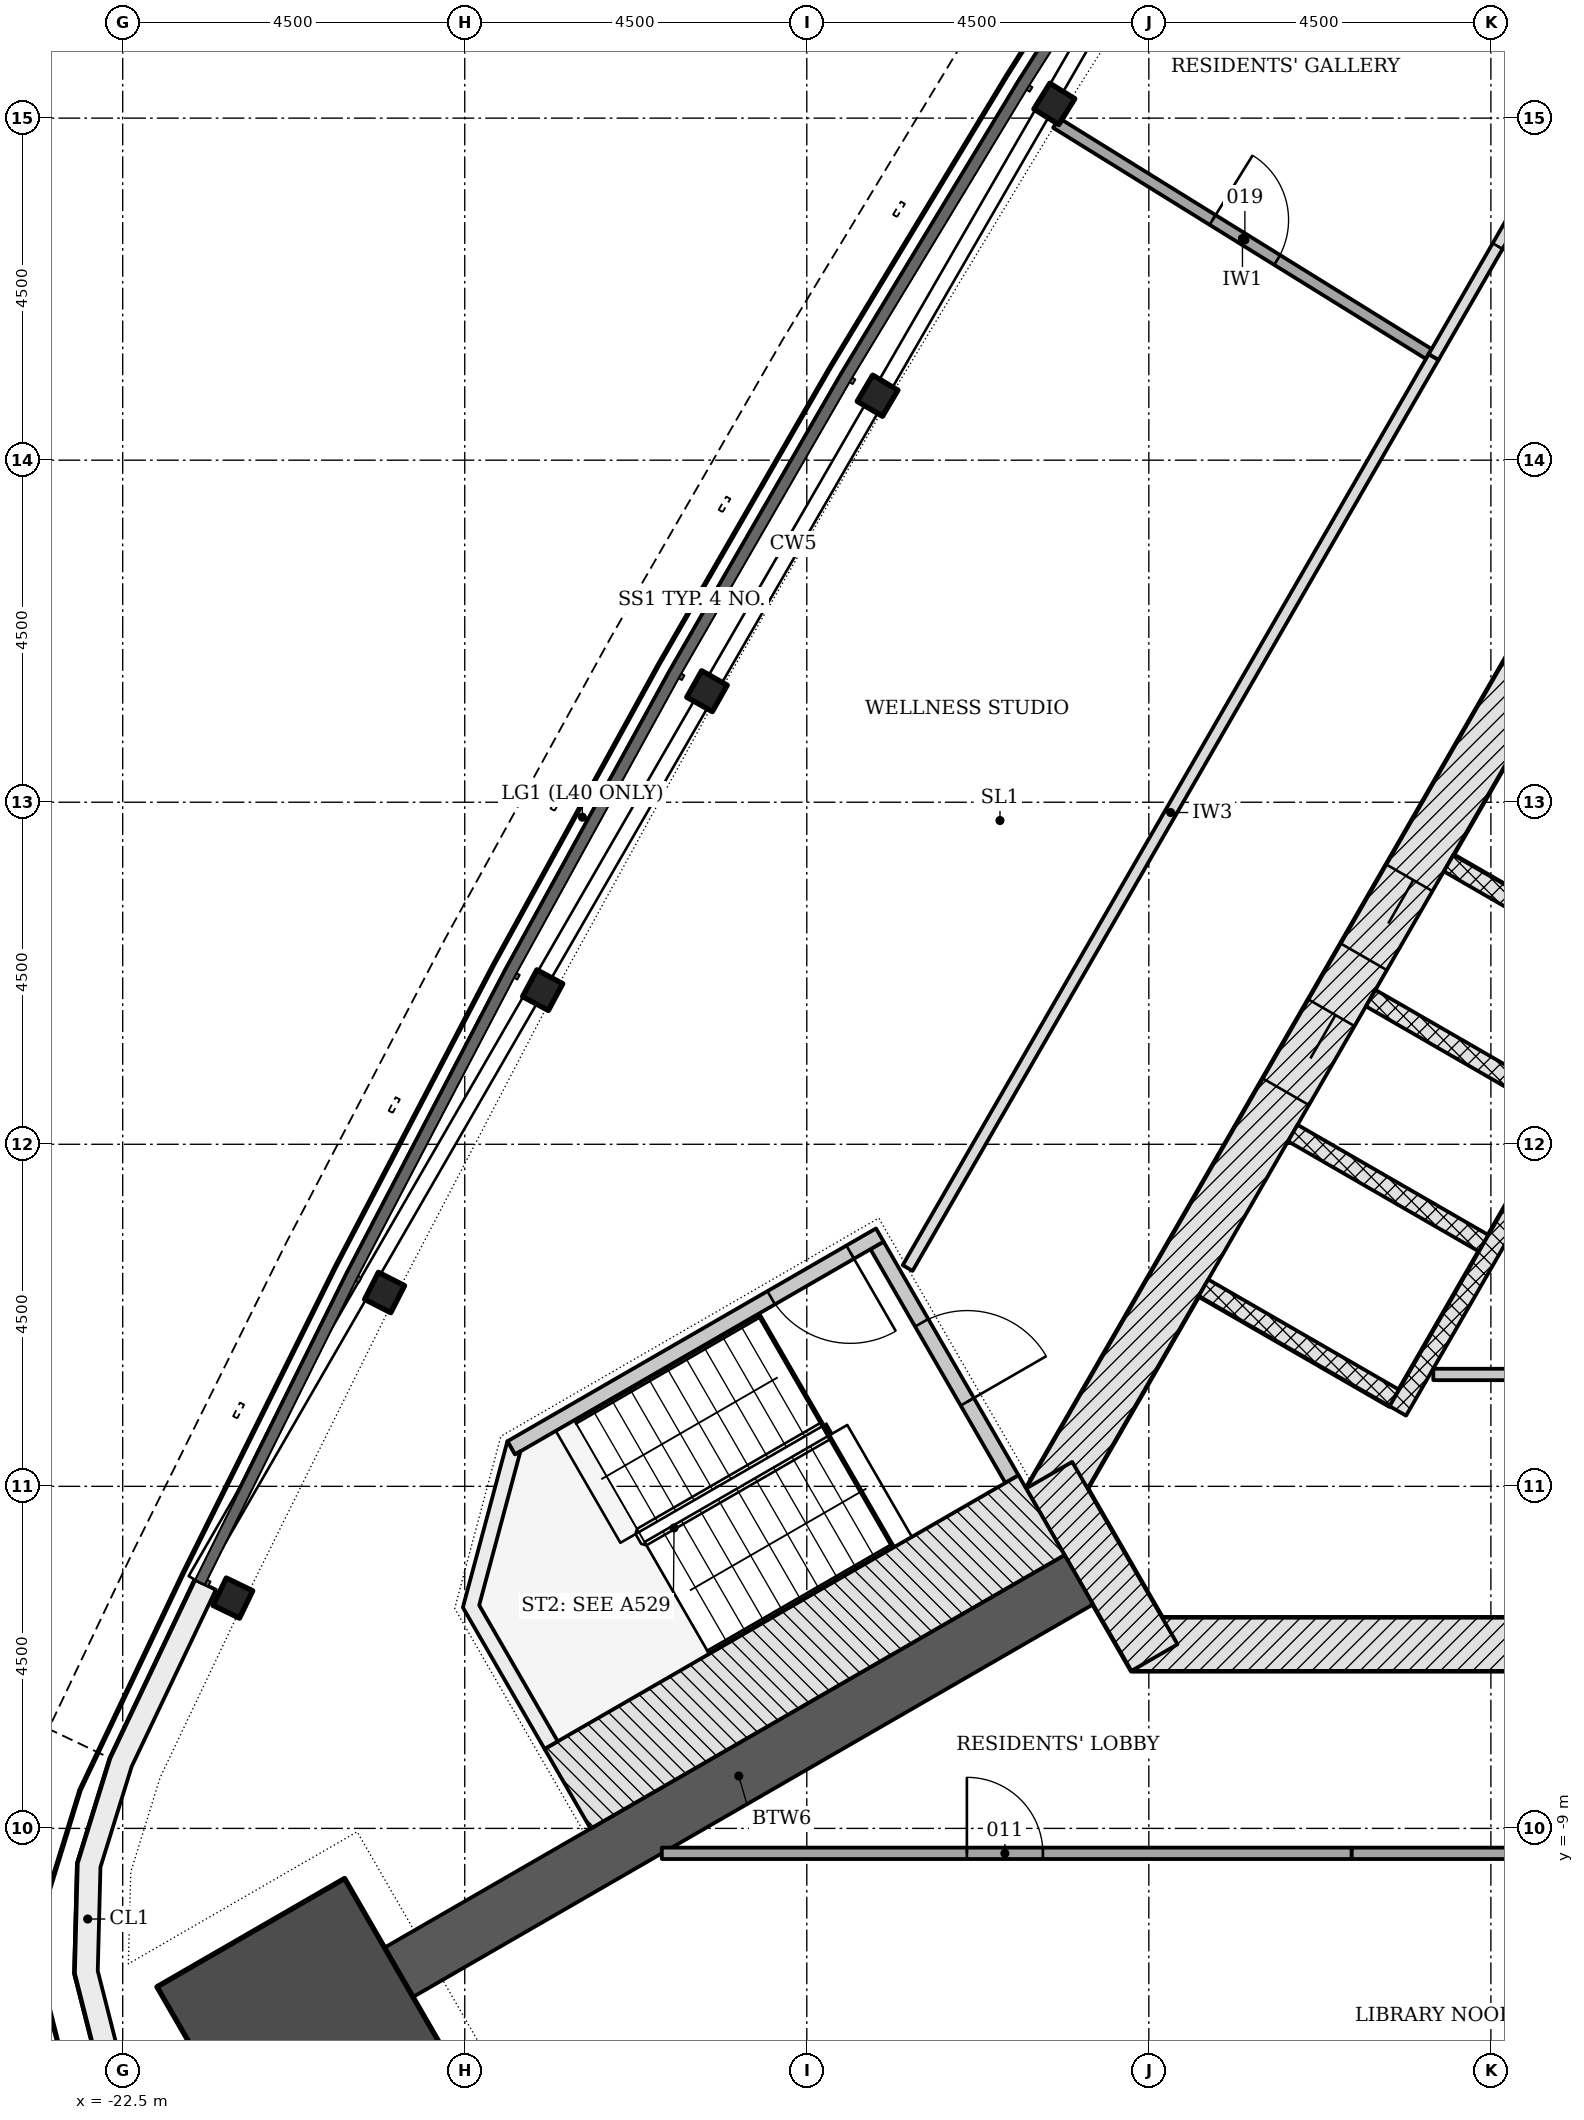
"""IFC4 building model, lengths in metres.
Left out: names, types, materials, properties, quantities, classifications, styles, units other than length and angle.
Written with IfcOpenShell. Run it as: python <this file> out.ifc"""

import sys

from ifc_helpers import new_model, si_unit, direction, frame, frame_2d, origin, origin_2d, place, context, subcontext, project, spatial, polyline, rectangle, i_section, outline, extrude, element, fill, save


model = new_model("IFC4")
c1 = context("Model", 3, precision=1e-05, world=origin(), true_north=direction((0.0, 1.0)))
c2 = subcontext(c1, "Body", "Model", "MODEL_VIEW")
j1 = project(units=[si_unit("LENGTHUNIT", "METRE"), si_unit("PLANEANGLEUNIT", "RADIAN")], contexts=[c1])
p1 = place(None, origin())
s1 = spatial("IfcSite", under=j1, at=p1, CompositionType="ELEMENT")
p2 = place(p1, origin())
s2 = spatial("IfcBuilding", under=s1, at=p2, CompositionType="ELEMENT")
p3 = place(p2, frame((0.0, 0.0, 158.1)))
s3 = spatial("IfcBuildingStorey", under=s2, at=p3, CompositionType="ELEMENT", Elevation=158.1)
p4 = place(p3, frame((-9.229, -6.578, -0.2), z_axis=(0.0, 0.0, 1.0), x_axis=(1.0, 0.0, 0.0)))
e1 = element("IfcWall", 1, at=p4, inside=s3, PredefinedType="SHEAR", context=c2, shape_type="SweptSolid", body=[
    extrude(rectangle(XDim=18.458, YDim=0.7, at=frame_2d((9.229, 0.0))), origin(), (0.0, 0.0, 1.0), 3.6),
])
p5 = place(p4, frame((10.7, 0.0, 0.2)))
e2 = element("IfcOpeningElement", 2, at=p5, cuts=e1, PredefinedType="OPENING", context=c2, shape_type="SweptSolid", body=[
    extrude(rectangle(XDim=1.0, YDim=2.1, at=frame_2d((0.5, 1.05))), frame((0.0, 0.36, 0.0), z_axis=(0.0, -1.0, 0.0), x_axis=(1.0, 0.0, 0.0)), (0.0, 0.0, 1.0), 0.72),
])
p6 = place(p4, frame((4.977, 0.0, 0.2)))
e3 = element("IfcOpeningElement", 3, at=p6, cuts=e1, PredefinedType="OPENING", context=c2, shape_type="SweptSolid", body=[
    extrude(rectangle(XDim=0.9, YDim=2.1, at=frame_2d((0.45, 1.05))), frame((0.0, 0.36, 0.0), z_axis=(0.0, -1.0, 0.0), x_axis=(1.0, 0.0, 0.0)), (0.0, 0.0, 1.0), 0.72),
])
p7 = place(p4, frame((14.552, 0.0, 0.2)))
e4 = element("IfcOpeningElement", 4, at=p7, cuts=e1, PredefinedType="OPENING", context=c2, shape_type="SweptSolid", body=[
    extrude(rectangle(XDim=0.9, YDim=2.1, at=frame_2d((0.45, 1.05))), frame((0.0, 0.36, 0.0), z_axis=(0.0, -1.0, 0.0), x_axis=(1.0, 0.0, 0.0)), (0.0, 0.0, 1.0), 0.72),
])
p8 = place(p3, frame((-1.083, 11.281, -0.2), z_axis=(0.0, 0.0, 1.0), x_axis=(-0.500001446645, -0.866024568562, 0.0)))
e5 = element("IfcWall", 5, at=p8, inside=s3, PredefinedType="SHEAR", context=c2, shape_type="SweptSolid", body=[
    extrude(rectangle(XDim=18.458, YDim=0.7, at=frame_2d((9.229, 0.0))), origin(), (0.0, 0.0, 1.0), 3.6),
])
p9 = place(p8, frame((8.979, 0.0, 0.2)))
e6 = element("IfcOpeningElement", 6, at=p9, cuts=e5, PredefinedType="OPENING", context=c2, shape_type="SweptSolid", body=[
    extrude(rectangle(XDim=1.2, YDim=2.1, at=frame_2d((0.6, 1.05))), frame((0.0, 0.36, 0.0), z_axis=(0.0, -1.0, 0.0), x_axis=(1.0, 0.0, 0.0)), (0.0, 0.0, 1.0), 0.72),
])
p10 = place(p8, frame((11.029, 0.0, 0.2)))
e7 = element("IfcOpeningElement", 7, at=p10, cuts=e5, PredefinedType="OPENING", context=c2, shape_type="SweptSolid", body=[
    extrude(rectangle(XDim=1.2, YDim=2.1, at=frame_2d((0.6, 1.05))), frame((0.0, 0.36, 0.0), z_axis=(0.0, -1.0, 0.0), x_axis=(1.0, 0.0, 0.0)), (0.0, 0.0, 1.0), 0.72),
])
p11 = place(p3, frame((-10.311, -4.353, -0.2), z_axis=(0.0, 0.0, 1.0), x_axis=(0.500042739161, -0.866000726912, 0.0)))
e8 = element("IfcWall", 8, at=p11, inside=s3, PredefinedType="SHEAR", context=c2, shape_type="SweptSolid", body=[
    extrude(rectangle(XDim=2.771, YDim=0.7, at=frame_2d((1.386, 0.0))), origin(), (0.0, 0.0, 1.0), 3.6),
])
p12 = place(p3, frame((-9.922, -5.728, -0.2), z_axis=(0.0, 0.0, 1.0), x_axis=(-0.866025410072, -0.499999989109, 0.0)))
e9 = element("IfcWall", 9, at=p12, inside=s3, PredefinedType="SHEAR", context=c2, shape_type="SweptSolid", body=[
    extrude(rectangle(XDim=10.331, YDim=0.75, at=frame_2d((5.165, 0.0))), origin(), (0.0, 0.0, 1.0), 3.6),
])
p13 = place(p3, frame((-20.102, -11.606, -0.2), z_axis=(0.0, 0.0, 1.0), x_axis=(-0.866025403784, -0.5, 0.0)))
e10 = element("IfcColumn", 10, at=p13, inside=s3, PredefinedType="COLUMN", context=c2, shape_type="SweptSolid", body=[
    extrude(rectangle(XDim=2.85, YDim=2.85, at=origin_2d()), origin(), (0.0, 0.0, 1.0), 3.6),
])
for number, where, z_axis, x_axis in (
    (11, (-10.244, 13.687, -0.2), (0.0, 0.0, 1.0), (-0.527, -0.85, 0.0)),
    (12, (-12.569, 9.848, -0.2), (0.0, 0.0, 1.0), (-0.509, -0.861, 0.0)),
    (13, (-14.813, 5.961, -0.2), (0.0, 0.0, 1.0), (-0.491, -0.871, 0.0)),
    (14, (-16.975, 2.028, -0.2), (0.0, 0.0, 1.0), (-0.473, -0.881, 0.0)),
    (15, (-19.055, -1.95, -0.2), (0.0, 0.0, 1.0), (-0.454, -0.891, 0.0)),
    (16, (-21.05, -5.97, -0.2), (0.0, 0.0, 1.0), (-0.435, -0.9, 0.0)),
):
    element("IfcColumn", number, at=place(p3, frame(where, z_axis=z_axis, x_axis=x_axis)), inside=s3, PredefinedType="COLUMN", context=c2, shape_type="SweptSolid", body=[
        extrude(i_section(OverallWidth=0.399, OverallDepth=0.386, WebThickness=0.021, FlangeThickness=0.033, FilletRadius=0.015, at=origin_2d()), origin(), (0.0, 0.0, 1.0), 3.6),
    ])
p14 = place(p3, origin())
e17 = element("IfcWall", 17, at=p14, inside=s3, PredefinedType="NOTDEFINED", context=c2, shape_type="SweptSolid", body=[
    extrude(outline(polyline([(-21.545, -5.731), (-22.663, -8.078), (-23.092, -9.461), (-23.129, -10.908), (-22.773, -12.312), (-22.049, -13.566), (-21.011, -14.576), (-19.739, -15.267), (-18.327, -15.587), (-15.736, -15.793), (-15.712, -15.494), (-18.281, -15.29), (-19.632, -14.984), (-20.832, -14.333), (-21.81, -13.38), (-22.492, -12.198), (-22.828, -10.875), (-22.793, -9.51), (-22.382, -8.187), (-21.275, -5.86), (-21.545, -5.731)])), origin(), (0.0, 0.0, 1.0), 3.3),
])
for number, where, z_axis, x_axis in (
    (18, (-5.056, 3.699, -0.2), (0.0, 0.0, 1.0), (0.866, -0.5, 0.0)),
    (19, (-6.081, 1.923, -0.2), (0.0, 0.0, 1.0), (0.866, -0.5, 0.0)),
    (20, (-7.106, 0.148, -0.2), (0.0, 0.0, 1.0), (0.866, -0.5, 0.0)),
    (21, (-8.281, -1.887, -0.2), (0.0, 0.0, 1.0), (0.866, -0.5, 0.0)),
):
    element("IfcWall", number, at=place(p3, frame(where, z_axis=z_axis, x_axis=x_axis)), inside=s3, PredefinedType="PARTITIONING", context=c2, shape_type="SweptSolid", body=[
        extrude(rectangle(XDim=2.9, YDim=0.25, at=frame_2d((1.45, 0.0))), origin(), (0.0, 0.0, 1.0), 3.6),
    ])
p15 = place(p3, frame((-2.374, 2.294, 0.0), z_axis=(0.0, 0.0, 1.0), x_axis=(-0.500003174267, -0.866023571113, 0.0)))
e22 = element("IfcWall", 22, at=p15, inside=s3, PredefinedType="PARTITIONING", context=c2, shape_type="SweptSolid", body=[
    extrude(rectangle(XDim=6.7, YDim=0.25, at=frame_2d((3.35, 0.0))), origin(), (0.0, 0.0, 1.0), 3.4),
])
p16 = place(p3, frame((-5.258, -3.028, 0.0), z_axis=(0.0, 0.0, 1.0), x_axis=(1.0, 0.0, 0.0)))
e23 = element("IfcWall", 23, at=p16, inside=s3, PredefinedType="PARTITIONING", context=c2, shape_type="SweptSolid", body=[
    extrude(rectangle(XDim=6.404, YDim=0.15, at=frame_2d((3.202, 0.0))), origin(), (0.0, 0.0, 1.0), 3.4),
])
p17 = place(p3, frame((-12.576, -1.331, -0.2), z_axis=(0.0, 0.0, 1.0), x_axis=(0.499970499736, -0.8660424351, 0.0)))
e24 = element("IfcWall", 24, at=p17, inside=s3, PredefinedType="SHEAR", context=c2, shape_type="SweptSolid", body=[
    extrude(rectangle(XDim=3.55, YDim=0.2, at=frame_2d((1.775, 0.0))), origin(), (0.0, 0.0, 1.0), 3.6),
])
p18 = place(p17, frame((1.175, 0.0, 0.2)))
e25 = element("IfcOpeningElement", 25, at=p18, cuts=e24, PredefinedType="OPENING", context=c2, shape_type="SweptSolid", body=[
    extrude(rectangle(XDim=1.2, YDim=2.1, at=frame_2d((0.6, 1.05))), frame((0.0, 0.11, 0.0), z_axis=(0.0, -1.0, 0.0), x_axis=(1.0, 0.0, 0.0)), (0.0, 0.0, 1.0), 0.22),
])
p19 = place(p3, frame((-12.539, -1.194, -0.2), z_axis=(0.0, 0.0, 1.0), x_axis=(-0.866045472092, -0.499965239061, 0.0)))
e26 = element("IfcWall", 26, at=p19, inside=s3, PredefinedType="SHEAR", context=c2, shape_type="SweptSolid", body=[
    extrude(rectangle(XDim=5.6, YDim=0.2, at=frame_2d((2.8, 0.0))), origin(), (0.0, 0.0, 1.0), 3.6),
])
p20 = place(p19, frame((0.45, 0.0, 0.2)))
e27 = element("IfcOpeningElement", 27, at=p20, cuts=e26, PredefinedType="OPENING", context=c2, shape_type="SweptSolid", body=[
    extrude(rectangle(XDim=1.2, YDim=2.1, at=frame_2d((0.6, 1.05))), frame((0.0, 0.11, 0.0), z_axis=(0.0, -1.0, 0.0), x_axis=(1.0, 0.0, 0.0)), (0.0, 0.0, 1.0), 0.22),
])
p21 = place(p3, frame((-10.412, -4.879, -0.2), z_axis=(0.0, 0.0, 1.0), x_axis=(-0.866026919366, -0.499997374926, 0.0)))
e28 = element("IfcWall", 28, at=p21, inside=s3, PredefinedType="SHEAR", context=c2, shape_type="SweptSolid", body=[
    extrude(rectangle(XDim=7.2, YDim=1.211, at=frame_2d((3.6, 0.0))), origin(), (0.0, 0.0, 1.0), 3.6),
])
p22 = place(p3, frame((0.0, 0.0, -0.2)))
e29 = element("IfcWall", 29, at=p22, inside=s3, PredefinedType="SHEAR", context=c2, shape_type="SweptSolid", body=[
    extrude(outline(polyline([(-17.439, -3.907), (-18.025, -6.093), (-16.95, -7.955), (-16.777, -7.855), (-17.81, -6.065), (-17.267, -4.039), (-17.339, -4.081), (-17.339, -4.081), (-17.339, -4.081), (-17.339, -4.081), (-17.339, -4.081), (-17.339, -4.081), (-17.339, -4.081), (-17.339, -4.081), (-17.339, -4.081), (-17.339, -4.081), (-17.339, -4.081), (-17.339, -4.081), (-17.339, -4.081), (-17.339, -4.081), (-17.339, -4.081), (-17.339, -4.081), (-17.339, -4.081), (-17.439, -3.907)])), origin(), (0.0, 0.0, 1.0), 3.6),
])
p23 = place(p3, frame((-15.407, -9.328, 0.0), z_axis=(0.0, 0.0, 1.0), x_axis=(1.0, 0.0, 0.0)))
e30 = element("IfcWall", 30, at=p23, inside=s3, PredefinedType="PARTITIONING", context=c2, shape_type="SweptSolid", body=[
    extrude(rectangle(XDim=9.076, YDim=0.15, at=frame_2d((4.538, 0.0))), origin(), (0.0, 0.0, 1.0), 2.847),
])
p24 = place(p23, frame((4.013, 0.0, 0.0)))
e31 = element("IfcOpeningElement", 31, at=p24, cuts=e30, PredefinedType="OPENING", context=c2, shape_type="SweptSolid", body=[
    extrude(rectangle(XDim=1.0, YDim=2.1, at=frame_2d((0.5, 1.05))), frame((0.0, 0.085, 0.0), z_axis=(0.0, -1.0, 0.0), x_axis=(1.0, 0.0, 0.0)), (0.0, 0.0, 1.0), 0.17),
])
p25 = place(p3, frame((-6.331, -9.328, 0.0), z_axis=(0.0, 0.0, 1.0), x_axis=(1.0, 0.0, 0.0)))
e32 = element("IfcWall", 32, at=p25, inside=s3, PredefinedType="PARTITIONING", context=c2, shape_type="SweptSolid", body=[
    extrude(rectangle(XDim=4.354, YDim=0.15, at=frame_2d((2.177, 0.0))), origin(), (0.0, 0.0, 1.0), 2.847),
])
p26 = place(p3, frame((-5.253, 10.358, 0.0), z_axis=(0.0, 0.0, 1.0), x_axis=(-0.49999425657, -0.86602871973, 0.0)))
e33 = element("IfcWall", 33, at=p26, inside=s3, PredefinedType="PARTITIONING", context=c2, shape_type="SweptSolid", body=[
    extrude(rectangle(XDim=13.84, YDim=0.15, at=frame_2d((6.92, 0.0))), origin(), (0.0, 0.0, 1.0), 2.847),
])
p27 = place(p3, frame((-7.82, 17.226, 0.0), z_axis=(0.0, 0.0, 1.0), x_axis=(0.838649113596, -0.544672070391, 0.0)))
e34 = element("IfcWall", 34, at=p27, inside=s3, PredefinedType="PARTITIONING", context=c2, shape_type="SweptSolid", body=[
    extrude(rectangle(XDim=5.59, YDim=0.15, at=frame_2d((2.795, 0.0))), origin(), (0.0, 0.0, 1.0), 3.4),
])
p28 = place(p27, frame((1.181, 0.0, 0.0)))
e35 = element("IfcOpeningElement", 35, at=p28, cuts=e34, PredefinedType="OPENING", context=c2, shape_type="SweptSolid", body=[
    extrude(rectangle(XDim=1.0, YDim=2.1, at=frame_2d((0.5, 1.05))), frame((0.0, 0.085, 0.0), z_axis=(0.0, -1.0, 0.0), x_axis=(1.0, 0.0, 0.0)), (0.0, 0.0, 1.0), 0.17),
])
p29 = place(p3, frame((-10.22, 13.437, 0.0), z_axis=(0.0, 0.0, 1.0), x_axis=(0.849899659129, -0.526944560094, 0.0)))
e36 = element("IfcWall", 36, at=p29, inside=s3, PredefinedType="PARTITIONING", context=c2, shape_type="SweptSolid", body=[
    extrude(rectangle(XDim=5.769, YDim=0.15, at=frame_2d((2.884, 0.0))), origin(), (0.0, 0.0, 1.0), 3.4),
])
p30 = place(p29, frame((2.422, 0.0, 0.0)))
e37 = element("IfcOpeningElement", 37, at=p30, cuts=e36, PredefinedType="OPENING", context=c2, shape_type="SweptSolid", body=[
    extrude(rectangle(XDim=1.0, YDim=2.1, at=frame_2d((0.5, 1.05))), frame((0.0, 0.085, 0.0), z_axis=(0.0, -1.0, 0.0), x_axis=(1.0, 0.0, 0.0)), (0.0, 0.0, 1.0), 0.17),
])
p31 = place(p3, frame((-3.069, 14.141, 0.0), z_axis=(0.0, 0.0, 1.0), x_axis=(-0.500015937133, -0.866016202281, 0.0)))
e38 = element("IfcWall", 38, at=p31, inside=s3, PredefinedType="PARTITIONING", context=c2, shape_type="SweptSolid", body=[
    extrude(rectangle(XDim=4.368, YDim=0.15, at=frame_2d((2.184, 0.0))), origin(), (0.0, 0.0, 1.0), 2.847),
])
p32 = place(p31, frame((1.684, 0.0, 0.0)))
e39 = element("IfcOpeningElement", 39, at=p32, cuts=e38, PredefinedType="OPENING", context=c2, shape_type="SweptSolid", body=[
    extrude(rectangle(XDim=1.0, YDim=2.1, at=frame_2d((0.5, 1.05))), frame((0.0, 0.085, 0.0), z_axis=(0.0, -1.0, 0.0), x_axis=(1.0, 0.0, 0.0)), (0.0, 0.0, 1.0), 0.17),
])
p33 = place(p9, origin())
e40 = element("IfcDoor", 40, at=p33, inside=s3, OperationType="DOUBLE_DOOR_SLIDING", PredefinedType="DOOR", context=c2, shape_type="SweptSolid", body=[
    extrude(rectangle(XDim=1.2, YDim=2.1, at=frame_2d((0.6, 1.05))), frame((0.0, 0.025, 0.0), z_axis=(0.0, -1.0, 0.0), x_axis=(1.0, 0.0, 0.0)), (0.0, 0.0, 1.0), 0.05),
])
fill(e6, e40)
p34 = place(p10, origin())
e41 = element("IfcDoor", 41, at=p34, inside=s3, OperationType="DOUBLE_DOOR_SLIDING", PredefinedType="DOOR", context=c2, shape_type="SweptSolid", body=[
    extrude(rectangle(XDim=1.2, YDim=2.1, at=frame_2d((0.6, 1.05))), frame((0.0, 0.025, 0.0), z_axis=(0.0, -1.0, 0.0), x_axis=(1.0, 0.0, 0.0)), (0.0, 0.0, 1.0), 0.05),
])
fill(e7, e41)
p35 = place(p18, origin())
e42 = element("IfcDoor", 42, at=p35, inside=s3, OperationType="SINGLE_SWING_RIGHT", PredefinedType="DOOR", context=c2, shape_type="SweptSolid", body=[
    extrude(rectangle(XDim=1.2, YDim=2.1, at=frame_2d((0.6, 1.05))), frame((0.0, 0.025, 0.0), z_axis=(0.0, -1.0, 0.0), x_axis=(1.0, 0.0, 0.0)), (0.0, 0.0, 1.0), 0.05),
])
fill(e25, e42)
p36 = place(p20, origin())
e43 = element("IfcDoor", 43, at=p36, inside=s3, OperationType="SINGLE_SWING_LEFT", PredefinedType="DOOR", context=c2, shape_type="SweptSolid", body=[
    extrude(rectangle(XDim=1.2, YDim=2.1, at=frame_2d((0.6, 1.05))), frame((0.0, 0.025, 0.0), z_axis=(0.0, -1.0, 0.0), x_axis=(1.0, 0.0, 0.0)), (0.0, 0.0, 1.0), 0.05),
])
fill(e27, e43)
p37 = place(p24, origin())
e44 = element("IfcDoor", 44, at=p37, inside=s3, OperationType="SINGLE_SWING_LEFT", PredefinedType="DOOR", context=c2, shape_type="SweptSolid", body=[
    extrude(rectangle(XDim=1.0, YDim=2.1, at=frame_2d((0.5, 1.05))), frame((0.0, 0.025, 0.0), z_axis=(0.0, -1.0, 0.0), x_axis=(1.0, 0.0, 0.0)), (0.0, 0.0, 1.0), 0.05),
])
fill(e31, e44)
p38 = place(p32, origin())
e45 = element("IfcDoor", 45, at=p38, inside=s3, OperationType="SINGLE_SWING_RIGHT", PredefinedType="DOOR", context=c2, shape_type="SweptSolid", body=[
    extrude(rectangle(XDim=1.0, YDim=2.1, at=frame_2d((0.5, 1.05))), frame((0.0, 0.025, 0.0), z_axis=(0.0, -1.0, 0.0), x_axis=(1.0, 0.0, 0.0)), (0.0, 0.0, 1.0), 0.05),
])
fill(e39, e45)
p39 = place(p30, origin())
e46 = element("IfcDoor", 46, at=p39, inside=s3, OperationType="SINGLE_SWING_LEFT", PredefinedType="DOOR", context=c2, shape_type="SweptSolid", body=[
    extrude(rectangle(XDim=1.0, YDim=2.1, at=frame_2d((0.5, 1.05))), frame((0.0, 0.025, 0.0), z_axis=(0.0, -1.0, 0.0), x_axis=(1.0, 0.0, 0.0)), (0.0, 0.0, 1.0), 0.05),
])
fill(e37, e46)
save(model, sys.argv[1])
